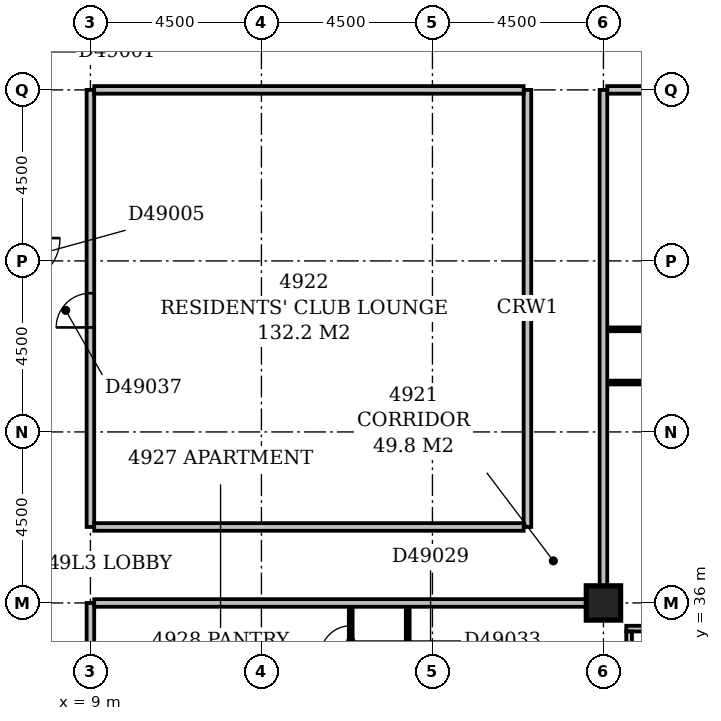
"""IFC4 building model, lengths in metres.
Left out: names, types, materials, properties, quantities, classifications, styles, units other than length and angle.
Written with IfcOpenShell. Run it as: python <this file> out.ifc"""

import sys

from ifc_helpers import new_model, si_unit, direction, frame, frame_2d, origin, origin_2d, place, context, subcontext, project, spatial, rectangle, extrude, element, fill, save


model = new_model("IFC4")
c1 = context("Model", 3, precision=1e-05, world=origin(), true_north=direction((0.0, 1.0)))
c2 = subcontext(c1, "Body", "Model", "MODEL_VIEW")
j1 = project(units=[si_unit("LENGTHUNIT", "METRE"), si_unit("PLANEANGLEUNIT", "RADIAN")], contexts=[c1])
p1 = place(None, origin())
s1 = spatial("IfcSite", under=j1, at=p1, CompositionType="ELEMENT")
p2 = place(p1, origin())
s2 = spatial("IfcBuilding", under=s1, at=p2, CompositionType="ELEMENT")
p3 = place(p2, frame((0.0, 0.0, 193.4)))
s3 = spatial("IfcBuildingStorey", under=s2, at=p3, CompositionType="ELEMENT", Elevation=193.4)
p4 = place(p3, frame((22.5, 36.0, -0.3), z_axis=(0.0, 0.0, 1.0), x_axis=(1.0, 0.0, 0.0)))
e1 = element("IfcColumn", 1, at=p4, inside=s3, PredefinedType="COLUMN", context=c2, shape_type="SweptSolid", body=[
    extrude(rectangle(XDim=0.9, YDim=0.9, at=origin_2d()), origin(), (0.0, 0.0, 1.0), 3.6),
])
p5 = place(p3, frame((23.175, 17.4, 0.0), z_axis=(0.0, 0.0, 1.0), x_axis=(0.0, 1.0, 0.0)))
e2 = element("IfcWall", 2, at=p5, inside=s3, PredefinedType="STANDARD", context=c2, shape_type="SweptSolid", body=[
    extrude(rectangle(XDim=17.85, YDim=0.15, at=frame_2d((8.925, 0.0))), origin(), (0.0, 0.0, 1.0), 2.7),
])
p6 = place(p5, frame((1.65, 0.0, 0.6)))
e3 = element("IfcOpeningElement", 3, at=p6, cuts=e2, PredefinedType="OPENING", context=c2, shape_type="SweptSolid", body=[
    extrude(rectangle(XDim=2.4, YDim=1.8, at=frame_2d((1.2, 0.9))), frame((0.0, 0.087, 0.0), z_axis=(0.0, -1.0, 0.0), x_axis=(1.0, 0.0, 0.0)), (0.0, 0.0, 1.0), 0.174),
])
p7 = place(p5, frame((7.922, 0.0, 0.6)))
e4 = element("IfcOpeningElement", 4, at=p7, cuts=e2, PredefinedType="OPENING", context=c2, shape_type="SweptSolid", body=[
    extrude(rectangle(XDim=0.9, YDim=1.8, at=frame_2d((0.45, 0.9))), frame((0.0, 0.087, 0.0), z_axis=(0.0, -1.0, 0.0), x_axis=(1.0, 0.0, 0.0)), (0.0, 0.0, 1.0), 0.174),
])
p8 = place(p5, frame((10.65, 0.0, 0.6)))
e5 = element("IfcOpeningElement", 5, at=p8, cuts=e2, PredefinedType="OPENING", context=c2, shape_type="SweptSolid", body=[
    extrude(rectangle(XDim=2.4, YDim=1.8, at=frame_2d((1.2, 0.9))), frame((0.0, 0.087, 0.0), z_axis=(0.0, -1.0, 0.0), x_axis=(1.0, 0.0, 0.0)), (0.0, 0.0, 1.0), 0.174),
])
p9 = place(p5, frame((15.15, 0.0, 0.6)))
e6 = element("IfcOpeningElement", 6, at=p9, cuts=e2, PredefinedType="OPENING", context=c2, shape_type="SweptSolid", body=[
    extrude(rectangle(XDim=2.4, YDim=1.8, at=frame_2d((1.2, 0.9))), frame((0.0, 0.087, 0.0), z_axis=(0.0, -1.0, 0.0), x_axis=(1.0, 0.0, 0.0)), (0.0, 0.0, 1.0), 0.174),
])
p10 = place(p3, frame((23.1, 35.325, 0.0), z_axis=(0.0, 0.0, 1.0), x_axis=(1.0, 0.0, 0.0)))
e7 = element("IfcWall", 7, at=p10, inside=s3, PredefinedType="STANDARD", context=c2, shape_type="SweptSolid", body=[
    extrude(rectangle(XDim=27.15, YDim=0.15, at=frame_2d((13.575, 0.0))), origin(), (0.0, 0.0, 1.0), 2.7),
])
p11 = place(p10, frame((0.45, 0.0, 0.6)))
e8 = element("IfcOpeningElement", 8, at=p11, cuts=e7, PredefinedType="OPENING", context=c2, shape_type="SweptSolid", body=[
    extrude(rectangle(XDim=2.4, YDim=1.8, at=frame_2d((1.2, 0.9))), frame((0.0, 0.087, 0.0), z_axis=(0.0, -1.0, 0.0), x_axis=(1.0, 0.0, 0.0)), (0.0, 0.0, 1.0), 0.174),
])
p12 = place(p10, frame((5.831, 0.0, 0.6)))
e9 = element("IfcOpeningElement", 9, at=p12, cuts=e7, PredefinedType="OPENING", context=c2, shape_type="SweptSolid", body=[
    extrude(rectangle(XDim=1.8, YDim=1.8, at=frame_2d((0.9, 0.9))), frame((0.0, 0.087, 0.0), z_axis=(0.0, -1.0, 0.0), x_axis=(1.0, 0.0, 0.0)), (0.0, 0.0, 1.0), 0.174),
])
p13 = place(p10, frame((9.45, 0.0, 0.6)))
e10 = element("IfcOpeningElement", 10, at=p13, cuts=e7, PredefinedType="OPENING", context=c2, shape_type="SweptSolid", body=[
    extrude(rectangle(XDim=2.4, YDim=1.8, at=frame_2d((1.2, 0.9))), frame((0.0, 0.087, 0.0), z_axis=(0.0, -1.0, 0.0), x_axis=(1.0, 0.0, 0.0)), (0.0, 0.0, 1.0), 0.174),
])
p14 = place(p10, frame((13.95, 0.0, 0.6)))
e11 = element("IfcOpeningElement", 11, at=p14, cuts=e7, PredefinedType="OPENING", context=c2, shape_type="SweptSolid", body=[
    extrude(rectangle(XDim=2.4, YDim=1.8, at=frame_2d((1.2, 0.9))), frame((0.0, 0.087, 0.0), z_axis=(0.0, -1.0, 0.0), x_axis=(1.0, 0.0, 0.0)), (0.0, 0.0, 1.0), 0.174),
])
p15 = place(p10, frame((18.153, 0.0, 0.6)))
e12 = element("IfcOpeningElement", 12, at=p15, cuts=e7, PredefinedType="OPENING", context=c2, shape_type="SweptSolid", body=[
    extrude(rectangle(XDim=2.4, YDim=1.8, at=frame_2d((1.2, 0.9))), frame((0.0, 0.087, 0.0), z_axis=(0.0, -1.0, 0.0), x_axis=(1.0, 0.0, 0.0)), (0.0, 0.0, 1.0), 0.174),
])
p16 = place(p10, frame((22.95, 0.0, 0.6)))
e13 = element("IfcOpeningElement", 13, at=p16, cuts=e7, PredefinedType="OPENING", context=c2, shape_type="SweptSolid", body=[
    extrude(rectangle(XDim=2.4, YDim=1.8, at=frame_2d((1.2, 0.9))), frame((0.0, 0.087, 0.0), z_axis=(0.0, -1.0, 0.0), x_axis=(1.0, 0.0, 0.0)), (0.0, 0.0, 1.0), 0.174),
])
p17 = place(p3, frame((9.0, 5.0, 0.0), z_axis=(0.0, 0.0, 1.0), x_axis=(0.0, 1.0, 0.0)))
e14 = element("IfcWall", 14, at=p17, inside=s3, PredefinedType="PARTITIONING", context=c2, shape_type="SweptSolid", body=[
    extrude(rectangle(XDim=31.0, YDim=0.2, at=frame_2d((15.5, 0.0))), origin(), (0.0, 0.0, 1.0), 3.3),
])
p18 = place(p17, frame((17.8, 0.0, 0.0)))
e15 = element("IfcOpeningElement", 15, at=p18, cuts=e14, PredefinedType="OPENING", context=c2, shape_type="SweptSolid", body=[
    extrude(rectangle(XDim=1.0, YDim=2.1, at=frame_2d((0.5, 1.05))), frame((0.0, 0.112, 0.0), z_axis=(0.0, -1.0, 0.0), x_axis=(1.0, 0.0, 0.0)), (0.0, 0.0, 1.0), 0.224),
])
p19 = place(p17, frame((14.95, 0.0, 0.0)))
e16 = element("IfcOpeningElement", 16, at=p19, cuts=e14, PredefinedType="OPENING", context=c2, shape_type="SweptSolid", body=[
    extrude(rectangle(XDim=1.0, YDim=2.1, at=frame_2d((0.5, 1.05))), frame((0.0, 0.112, 0.0), z_axis=(0.0, -1.0, 0.0), x_axis=(1.0, 0.0, 0.0)), (0.0, 0.0, 1.0), 0.224),
])
p20 = place(p17, frame((9.3, 0.0, 0.0)))
e17 = element("IfcOpeningElement", 17, at=p20, cuts=e14, PredefinedType="OPENING", context=c2, shape_type="SweptSolid", body=[
    extrude(rectangle(XDim=1.0, YDim=2.1, at=frame_2d((0.5, 1.05))), frame((0.0, 0.112, 0.0), z_axis=(0.0, -1.0, 0.0), x_axis=(1.0, 0.0, 0.0)), (0.0, 0.0, 1.0), 0.224),
])
p21 = place(p17, frame((1.5, 0.0, 0.0)))
e18 = element("IfcOpeningElement", 18, at=p21, cuts=e14, PredefinedType="OPENING", context=c2, shape_type="SweptSolid", body=[
    extrude(rectangle(XDim=0.9, YDim=2.1, at=frame_2d((0.45, 1.05))), frame((0.0, 0.112, 0.0), z_axis=(0.0, -1.0, 0.0), x_axis=(1.0, 0.0, 0.0)), (0.0, 0.0, 1.0), 0.224),
])
p22 = place(p3, frame((17.35, 22.6, 0.0), z_axis=(0.0, 0.0, 1.0), x_axis=(0.0, 1.0, 0.0)))
e19 = element("IfcWall", 19, at=p22, inside=s3, PredefinedType="PARTITIONING", context=c2, shape_type="SweptSolid", body=[
    extrude(rectangle(XDim=13.3, YDim=0.1, at=frame_2d((6.65, 0.0))), origin(), (0.0, 0.0, 1.0), 3.3),
])
p23 = place(p22, frame((1.7, 0.0, 0.0)))
e20 = element("IfcOpeningElement", 20, at=p23, cuts=e19, PredefinedType="OPENING", context=c2, shape_type="SweptSolid", body=[
    extrude(rectangle(XDim=0.9, YDim=2.1, at=frame_2d((0.45, 1.05))), frame((0.0, 0.062, 0.0), z_axis=(0.0, -1.0, 0.0), x_axis=(1.0, 0.0, 0.0)), (0.0, 0.0, 1.0), 0.124),
])
p24 = place(p22, frame((7.35, 0.0, 0.0)))
e21 = element("IfcOpeningElement", 21, at=p24, cuts=e19, PredefinedType="OPENING", context=c2, shape_type="SweptSolid", body=[
    extrude(rectangle(XDim=0.9, YDim=2.1, at=frame_2d((0.45, 1.05))), frame((0.0, 0.062, 0.0), z_axis=(0.0, -1.0, 0.0), x_axis=(1.0, 0.0, 0.0)), (0.0, 0.0, 1.0), 0.124),
])
p25 = place(p22, frame((10.7, 0.0, 0.0)))
e22 = element("IfcOpeningElement", 22, at=p25, cuts=e19, PredefinedType="OPENING", context=c2, shape_type="SweptSolid", body=[
    extrude(rectangle(XDim=0.9, YDim=2.1, at=frame_2d((0.45, 1.05))), frame((0.0, 0.062, 0.0), z_axis=(0.0, -1.0, 0.0), x_axis=(1.0, 0.0, 0.0)), (0.0, 0.0, 1.0), 0.124),
])
p26 = place(p3, frame((15.85, 24.1, 0.0), z_axis=(0.0, 0.0, 1.0), x_axis=(0.0, 1.0, 0.0)))
e23 = element("IfcWall", 23, at=p26, inside=s3, PredefinedType="PARTITIONING", context=c2, shape_type="SweptSolid", body=[
    extrude(rectangle(XDim=11.8, YDim=0.1, at=frame_2d((5.9, 0.0))), origin(), (0.0, 0.0, 1.0), 3.3),
])
p27 = place(p26, frame((4.7, 0.0, 0.0)))
e24 = element("IfcOpeningElement", 24, at=p27, cuts=e23, PredefinedType="OPENING", context=c2, shape_type="SweptSolid", body=[
    extrude(rectangle(XDim=0.8, YDim=2.1, at=frame_2d((0.4, 1.05))), frame((0.0, 0.062, 0.0), z_axis=(0.0, -1.0, 0.0), x_axis=(1.0, 0.0, 0.0)), (0.0, 0.0, 1.0), 0.124),
])
p28 = place(p26, frame((1.5, 0.0, 0.0)))
e25 = element("IfcOpeningElement", 25, at=p28, cuts=e23, PredefinedType="OPENING", context=c2, shape_type="SweptSolid", body=[
    extrude(rectangle(XDim=0.9, YDim=2.1, at=frame_2d((0.45, 1.05))), frame((0.0, 0.062, 0.0), z_axis=(0.0, -1.0, 0.0), x_axis=(1.0, 0.0, 0.0)), (0.0, 0.0, 1.0), 0.124),
])
p29 = place(p26, frame((10.5, 0.0, 0.0)))
e26 = element("IfcOpeningElement", 26, at=p29, cuts=e23, PredefinedType="OPENING", context=c2, shape_type="SweptSolid", body=[
    extrude(rectangle(XDim=0.8, YDim=2.1, at=frame_2d((0.4, 1.05))), frame((0.0, 0.062, 0.0), z_axis=(0.0, -1.0, 0.0), x_axis=(1.0, 0.0, 0.0)), (0.0, 0.0, 1.0), 0.124),
])
p30 = place(p26, frame((6.7, 0.0, 0.0)))
e27 = element("IfcOpeningElement", 27, at=p30, cuts=e23, PredefinedType="OPENING", context=c2, shape_type="SweptSolid", body=[
    extrude(rectangle(XDim=0.8, YDim=2.1, at=frame_2d((0.4, 1.05))), frame((0.0, 0.062, 0.0), z_axis=(0.0, -1.0, 0.0), x_axis=(1.0, 0.0, 0.0)), (0.0, 0.0, 1.0), 0.124),
])
p31 = place(p26, frame((8.5, 0.0, 0.0)))
e28 = element("IfcOpeningElement", 28, at=p31, cuts=e23, PredefinedType="OPENING", context=c2, shape_type="SweptSolid", body=[
    extrude(rectangle(XDim=0.8, YDim=2.1, at=frame_2d((0.4, 1.05))), frame((0.0, 0.062, 0.0), z_axis=(0.0, -1.0, 0.0), x_axis=(1.0, 0.0, 0.0)), (0.0, 0.0, 1.0), 0.124),
])
p32 = place(p3, frame((9.1, 36.0, 0.0), z_axis=(0.0, 0.0, 1.0), x_axis=(1.0, 0.0, 0.0)))
e29 = element("IfcWall", 29, at=p32, inside=s3, PredefinedType="PARTITIONING", context=c2, shape_type="SweptSolid", body=[
    extrude(rectangle(XDim=12.95, YDim=0.2, at=frame_2d((6.475, 0.0))), origin(), (0.0, 0.0, 1.0), 3.3),
])
p33 = place(p3, frame((22.5, 36.45, 0.0), z_axis=(0.0, 0.0, 1.0), x_axis=(0.0, 1.0, 0.0)))
e30 = element("IfcWall", 30, at=p33, inside=s3, PredefinedType="PARTITIONING", context=c2, shape_type="SweptSolid", body=[
    extrude(rectangle(XDim=13.05, YDim=0.2, at=frame_2d((6.525, 0.0))), origin(), (0.0, 0.0, 1.0), 3.3),
])
p34 = place(p3, frame((9.0, 38.0, 0.0), z_axis=(0.0, 0.0, 1.0), x_axis=(0.0, 1.0, 0.0)))
e31 = element("IfcWall", 31, at=p34, inside=s3, PredefinedType="PARTITIONING", context=c2, shape_type="SweptSolid", body=[
    extrude(rectangle(XDim=11.5, YDim=0.2, at=frame_2d((5.75, 0.0))), origin(), (0.0, 0.0, 1.0), 3.3),
])
p35 = place(p34, frame((5.25, 0.0, 0.0)))
e32 = element("IfcOpeningElement", 32, at=p35, cuts=e31, PredefinedType="OPENING", context=c2, shape_type="SweptSolid", body=[
    extrude(rectangle(XDim=0.9, YDim=2.1, at=frame_2d((0.45, 1.05))), frame((0.0, 0.112, 0.0), z_axis=(0.0, -1.0, 0.0), x_axis=(1.0, 0.0, 0.0)), (0.0, 0.0, 1.0), 0.224),
])
p36 = place(p3, frame((9.1, 38.0, 0.0), z_axis=(0.0, 0.0, 1.0), x_axis=(1.0, 0.0, 0.0)))
e33 = element("IfcWall", 33, at=p36, inside=s3, PredefinedType="PARTITIONING", context=c2, shape_type="SweptSolid", body=[
    extrude(rectangle(XDim=11.3, YDim=0.2, at=frame_2d((5.65, 0.0))), origin(), (0.0, 0.0, 1.0), 3.3),
])
p37 = place(p3, frame((20.5, 38.0, 0.0), z_axis=(0.0, 0.0, 1.0), x_axis=(0.0, 1.0, 0.0)))
e34 = element("IfcWall", 34, at=p37, inside=s3, PredefinedType="PARTITIONING", context=c2, shape_type="SweptSolid", body=[
    extrude(rectangle(XDim=11.5, YDim=0.2, at=frame_2d((5.75, 0.0))), origin(), (0.0, 0.0, 1.0), 3.3),
])
p38 = place(p3, frame((22.6, 41.8, 0.0), z_axis=(0.0, 0.0, 1.0), x_axis=(1.0, 0.0, 0.0)))
e35 = element("IfcWall", 35, at=p38, inside=s3, PredefinedType="PARTITIONING", context=c2, shape_type="SweptSolid", body=[
    extrude(rectangle(XDim=13.3, YDim=0.1, at=frame_2d((6.65, 0.0))), origin(), (0.0, 0.0, 1.0), 3.3),
])
p39 = place(p38, frame((1.7, 0.0, 0.0)))
e36 = element("IfcOpeningElement", 36, at=p39, cuts=e35, PredefinedType="OPENING", context=c2, shape_type="SweptSolid", body=[
    extrude(rectangle(XDim=0.9, YDim=2.1, at=frame_2d((0.45, 1.05))), frame((0.0, 0.062, 0.0), z_axis=(0.0, -1.0, 0.0), x_axis=(1.0, 0.0, 0.0)), (0.0, 0.0, 1.0), 0.124),
])
p40 = place(p38, frame((6.2, 0.0, 0.0)))
e37 = element("IfcOpeningElement", 37, at=p40, cuts=e35, PredefinedType="OPENING", context=c2, shape_type="SweptSolid", body=[
    extrude(rectangle(XDim=0.9, YDim=2.1, at=frame_2d((0.45, 1.05))), frame((0.0, 0.062, 0.0), z_axis=(0.0, -1.0, 0.0), x_axis=(1.0, 0.0, 0.0)), (0.0, 0.0, 1.0), 0.124),
])
p41 = place(p38, frame((10.7, 0.0, 0.0)))
e38 = element("IfcOpeningElement", 38, at=p41, cuts=e35, PredefinedType="OPENING", context=c2, shape_type="SweptSolid", body=[
    extrude(rectangle(XDim=0.9, YDim=2.1, at=frame_2d((0.45, 1.05))), frame((0.0, 0.062, 0.0), z_axis=(0.0, -1.0, 0.0), x_axis=(1.0, 0.0, 0.0)), (0.0, 0.0, 1.0), 0.124),
])
p42 = place(p3, frame((22.6, 43.2, 0.0), z_axis=(0.0, 0.0, 1.0), x_axis=(1.0, 0.0, 0.0)))
e39 = element("IfcWall", 39, at=p42, inside=s3, PredefinedType="PARTITIONING", context=c2, shape_type="SweptSolid", body=[
    extrude(rectangle(XDim=5.75, YDim=0.1, at=frame_2d((2.875, 0.0))), origin(), (0.0, 0.0, 1.0), 3.3),
])
p43 = place(p42, frame((2.4, 0.0, 0.0)))
e40 = element("IfcOpeningElement", 40, at=p43, cuts=e39, PredefinedType="OPENING", context=c2, shape_type="SweptSolid", body=[
    extrude(rectangle(XDim=0.9, YDim=2.1, at=frame_2d((0.45, 1.05))), frame((0.0, 0.062, 0.0), z_axis=(0.0, -1.0, 0.0), x_axis=(1.0, 0.0, 0.0)), (0.0, 0.0, 1.0), 0.124),
])
p44 = place(p3, frame((9.1, 49.5, 0.0), z_axis=(0.0, 0.0, 1.0), x_axis=(1.0, 0.0, 0.0)))
e41 = element("IfcWall", 41, at=p44, inside=s3, PredefinedType="PARTITIONING", context=c2, shape_type="SweptSolid", body=[
    extrude(rectangle(XDim=11.3, YDim=0.2, at=frame_2d((5.65, 0.0))), origin(), (0.0, 0.0, 1.0), 3.3),
])
p45 = place(p3, frame((22.6, 49.5, 0.0), z_axis=(0.0, 0.0, 1.0), x_axis=(1.0, 0.0, 0.0)))
e42 = element("IfcWall", 42, at=p45, inside=s3, PredefinedType="PARTITIONING", context=c2, shape_type="SweptSolid", body=[
    extrude(rectangle(XDim=30.95, YDim=0.2, at=frame_2d((15.475, 0.0))), origin(), (0.0, 0.0, 1.0), 3.3),
])
p46 = place(p45, frame((6.1, 0.0, 0.0)))
e43 = element("IfcOpeningElement", 43, at=p46, cuts=e42, PredefinedType="OPENING", context=c2, shape_type="SweptSolid", body=[
    extrude(rectangle(XDim=1.0, YDim=2.1, at=frame_2d((0.5, 1.05))), frame((0.0, 0.112, 0.0), z_axis=(0.0, -1.0, 0.0), x_axis=(1.0, 0.0, 0.0)), (0.0, 0.0, 1.0), 0.224),
])
p47 = place(p45, frame((13.7, 0.0, 0.0)))
e44 = element("IfcOpeningElement", 44, at=p47, cuts=e42, PredefinedType="OPENING", context=c2, shape_type="SweptSolid", body=[
    extrude(rectangle(XDim=1.0, YDim=2.1, at=frame_2d((0.5, 1.05))), frame((0.0, 0.112, 0.0), z_axis=(0.0, -1.0, 0.0), x_axis=(1.0, 0.0, 0.0)), (0.0, 0.0, 1.0), 0.224),
])
p48 = place(p45, frame((27.15, 0.0, 0.0)))
e45 = element("IfcOpeningElement", 45, at=p48, cuts=e42, PredefinedType="OPENING", context=c2, shape_type="SweptSolid", body=[
    extrude(rectangle(XDim=1.0, YDim=2.1, at=frame_2d((0.5, 1.05))), frame((0.0, 0.112, 0.0), z_axis=(0.0, -1.0, 0.0), x_axis=(1.0, 0.0, 0.0)), (0.0, 0.0, 1.0), 0.224),
])
p49 = place(p29, origin())
e46 = element("IfcDoor", 46, at=p49, inside=s3, OperationType="SINGLE_SWING_LEFT", PredefinedType="DOOR", context=c2, shape_type="SweptSolid", body=[
    extrude(rectangle(XDim=0.8, YDim=2.1, at=frame_2d((0.4, 1.05))), frame((0.0, 0.025, 0.0), z_axis=(0.0, -1.0, 0.0), x_axis=(1.0, 0.0, 0.0)), (0.0, 0.0, 1.0), 0.05),
])
fill(e26, e46)
p50 = place(p35, origin())
e47 = element("IfcDoor", 47, at=p50, inside=s3, OperationType="SINGLE_SWING_LEFT", PredefinedType="DOOR", context=c2, shape_type="SweptSolid", body=[
    extrude(rectangle(XDim=0.9, YDim=2.1, at=frame_2d((0.45, 1.05))), frame((0.0, 0.025, 0.0), z_axis=(0.0, -1.0, 0.0), x_axis=(1.0, 0.0, 0.0)), (0.0, 0.0, 1.0), 0.05),
])
fill(e32, e47)
save(model, sys.argv[1])
